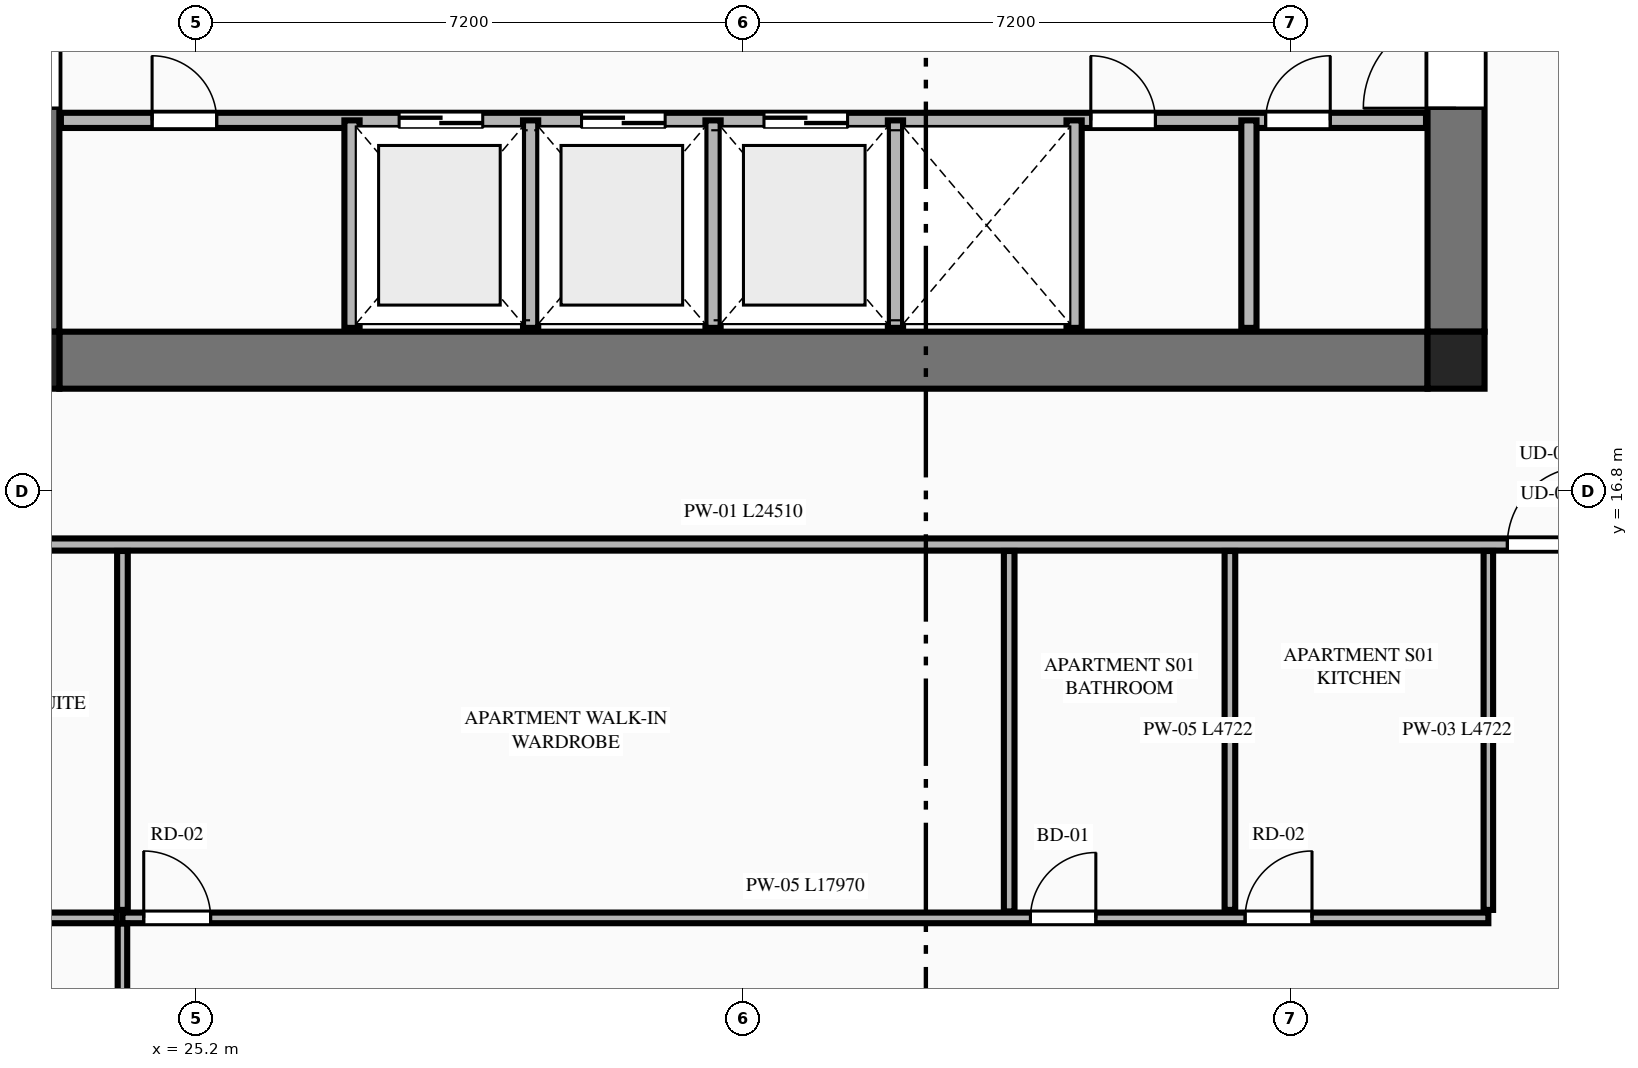
"""IFC4 building model, lengths in metres.
Left out: names, types, materials, properties, quantities, classifications, styles, units other than length and angle.
Written with IfcOpenShell. Run it as: python <this file> out.ifc"""

import sys

from ifc_helpers import new_model, si_unit, direction, frame, frame_2d, origin, origin_2d, place, context, subcontext, project, spatial, rectangle, extrude, element, fill, save


model = new_model("IFC4")
c1 = context("Model", 3, precision=1e-05, world=origin(), true_north=direction((0.0, 1.0)))
c2 = subcontext(c1, "Body", "Model", "MODEL_VIEW")
j1 = project(units=[si_unit("LENGTHUNIT", "METRE"), si_unit("PLANEANGLEUNIT", "RADIAN")], contexts=[c1])
p1 = place(None, origin())
s1 = spatial("IfcSite", under=j1, at=p1, CompositionType="ELEMENT")
p2 = place(p1, origin())
s2 = spatial("IfcBuilding", under=s1, at=p2, CompositionType="ELEMENT")
p3 = place(p2, frame((0.0, 0.0, 83.55)))
s3 = spatial("IfcBuildingStorey", under=s2, at=p3, CompositionType="ELEMENT", Elevation=83.55)
for number, where, z_axis, x_axis in (
    (1, (23.025, 18.525, 0.0), (0.0, 0.0, 1.0), (1.0, 0.0, 0.0)),
    (2, (41.775, 18.525, 0.0), (0.0, 0.0, 1.0), (1.0, 0.0, 0.0)),
):
    element("IfcColumn", number, at=place(p3, frame(where, z_axis=z_axis, x_axis=x_axis)), inside=s3, PredefinedType="COLUMN", context=c2, shape_type="SweptSolid", body=[
        extrude(rectangle(XDim=0.75, YDim=0.75, at=origin_2d()), origin(), (0.0, 0.0, 1.0), 3.55),
    ])
p4 = place(p3, frame((23.4, 18.525, 0.0), z_axis=(0.0, 0.0, 1.0), x_axis=(1.0, 0.0, 0.0)))
e3 = element("IfcWall", 3, at=p4, inside=s3, PredefinedType="SHEAR", context=c2, shape_type="SweptSolid", body=[
    extrude(rectangle(XDim=18.0, YDim=0.75, at=frame_2d((9.0, 0.0))), origin(), (0.0, 0.0, 1.0), 3.33),
])
p5 = place(p3, frame((23.025, 18.9, 0.0), z_axis=(0.0, 0.0, 1.0), x_axis=(0.0, 1.0, 0.0)))
e4 = element("IfcWall", 4, at=p5, inside=s3, PredefinedType="SHEAR", context=c2, shape_type="SweptSolid", body=[
    extrude(rectangle(XDim=14.0, YDim=0.75, at=frame_2d((7.0, 0.0))), origin(), (0.0, 0.0, 1.0), 3.33),
])
p6 = place(p5, frame((2.94, 0.0, 0.0)))
e5 = element("IfcOpeningElement", 5, at=p6, cuts=e4, PredefinedType="OPENING", context=c2, shape_type="SweptSolid", body=[
    extrude(rectangle(XDim=1.22, YDim=2.25, at=frame_2d((0.61, 1.125))), frame((0.0, 0.385, 0.0), z_axis=(0.0, -1.0, 0.0), x_axis=(1.0, 0.0, 0.0)), (0.0, 0.0, 1.0), 0.77),
])
p7 = place(p3, frame((41.775, 18.9, 0.0), z_axis=(0.0, 0.0, 1.0), x_axis=(0.0, 1.0, 0.0)))
e6 = element("IfcWall", 6, at=p7, inside=s3, PredefinedType="SHEAR", context=c2, shape_type="SweptSolid", body=[
    extrude(rectangle(XDim=14.0, YDim=0.75, at=frame_2d((7.0, 0.0))), origin(), (0.0, 0.0, 1.0), 3.33),
])
p8 = place(p7, frame((2.94, 0.0, 0.0)))
e7 = element("IfcOpeningElement", 7, at=p8, cuts=e6, PredefinedType="OPENING", context=c2, shape_type="SweptSolid", body=[
    extrude(rectangle(XDim=1.22, YDim=2.25, at=frame_2d((0.61, 1.125))), frame((0.0, 0.385, 0.0), z_axis=(0.0, -1.0, 0.0), x_axis=(1.0, 0.0, 0.0)), (0.0, 0.0, 1.0), 0.77),
])
p9 = place(p3, frame((23.42, 21.68, 0.0), z_axis=(0.0, 0.0, 1.0), x_axis=(1.0, 0.0, 0.0)))
e8 = element("IfcWall", 8, at=p9, inside=s3, PredefinedType="PLUMBINGWALL", context=c2, shape_type="SweptSolid", body=[
    extrude(rectangle(XDim=17.96, YDim=0.2, at=frame_2d((8.98, 0.0))), origin(), (0.0, 0.0, 1.0), 3.33),
])
p10 = place(p9, frame((4.45, 0.0, 0.0)))
e9 = element("IfcOpeningElement", 9, at=p10, cuts=e8, PredefinedType="OPENING", context=c2, shape_type="SweptSolid", body=[
    extrude(rectangle(XDim=1.1, YDim=2.2, at=frame_2d((0.55, 1.1))), frame((0.0, 0.11, 0.0), z_axis=(0.0, -1.0, 0.0), x_axis=(1.0, 0.0, 0.0)), (0.0, 0.0, 1.0), 0.22),
])
p11 = place(p9, frame((6.85, 0.0, 0.0)))
e10 = element("IfcOpeningElement", 10, at=p11, cuts=e8, PredefinedType="OPENING", context=c2, shape_type="SweptSolid", body=[
    extrude(rectangle(XDim=1.1, YDim=2.2, at=frame_2d((0.55, 1.1))), frame((0.0, 0.11, 0.0), z_axis=(0.0, -1.0, 0.0), x_axis=(1.0, 0.0, 0.0)), (0.0, 0.0, 1.0), 0.22),
])
p12 = place(p9, frame((9.25, 0.0, 0.0)))
e11 = element("IfcOpeningElement", 11, at=p12, cuts=e8, PredefinedType="OPENING", context=c2, shape_type="SweptSolid", body=[
    extrude(rectangle(XDim=1.1, YDim=2.2, at=frame_2d((0.55, 1.1))), frame((0.0, 0.11, 0.0), z_axis=(0.0, -1.0, 0.0), x_axis=(1.0, 0.0, 0.0)), (0.0, 0.0, 1.0), 0.22),
])
p13 = place(p9, frame((1.2, 0.0, 0.0)))
e12 = element("IfcOpeningElement", 12, at=p13, cuts=e8, PredefinedType="OPENING", context=c2, shape_type="SweptSolid", body=[
    extrude(rectangle(XDim=0.85, YDim=2.05, at=frame_2d((0.425, 1.025))), frame((0.0, 0.11, 0.0), z_axis=(0.0, -1.0, 0.0), x_axis=(1.0, 0.0, 0.0)), (0.0, 0.0, 1.0), 0.22),
])
p14 = place(p9, frame((13.55, 0.0, 0.0)))
e13 = element("IfcOpeningElement", 13, at=p14, cuts=e8, PredefinedType="OPENING", context=c2, shape_type="SweptSolid", body=[
    extrude(rectangle(XDim=0.85, YDim=2.05, at=frame_2d((0.425, 1.025))), frame((0.0, 0.11, 0.0), z_axis=(0.0, -1.0, 0.0), x_axis=(1.0, 0.0, 0.0)), (0.0, 0.0, 1.0), 0.22),
])
p15 = place(p9, frame((15.85, 0.0, 0.0)))
e14 = element("IfcOpeningElement", 14, at=p15, cuts=e8, PredefinedType="OPENING", context=c2, shape_type="SweptSolid", body=[
    extrude(rectangle(XDim=0.85, YDim=2.05, at=frame_2d((0.425, 1.025))), frame((0.0, 0.11, 0.0), z_axis=(0.0, -1.0, 0.0), x_axis=(1.0, 0.0, 0.0)), (0.0, 0.0, 1.0), 0.22),
])
for number, where, z_axis, x_axis in (
    (15, (27.25, 18.95, 0.0), (0.0, 0.0, 1.0), (0.0, 1.0, 0.0)),
    (16, (29.6, 18.95, 0.0), (0.0, 0.0, 1.0), (0.0, 1.0, 0.0)),
    (17, (32.0, 18.95, 0.0), (0.0, 0.0, 1.0), (0.0, 1.0, 0.0)),
    (18, (34.4, 18.95, 0.0), (0.0, 0.0, 1.0), (0.0, 1.0, 0.0)),
    (19, (36.75, 18.95, 0.0), (0.0, 0.0, 1.0), (0.0, 1.0, 0.0)),
    (20, (39.05, 18.95, 0.0), (0.0, 0.0, 1.0), (0.0, 1.0, 0.0)),
):
    element("IfcWall", number, at=place(p3, frame(where, z_axis=z_axis, x_axis=x_axis)), inside=s3, PredefinedType="PLUMBINGWALL", context=c2, shape_type="SweptSolid", body=[
        extrude(rectangle(XDim=2.73, YDim=0.2, at=frame_2d((1.365, 0.0))), origin(), (0.0, 0.0, 1.0), 3.33),
    ])
p16 = place(p3, frame((20.145, 16.1, 0.0), z_axis=(0.0, 0.0, 1.0), x_axis=(1.0, 0.0, 0.0)))
e21 = element("IfcWall", 21, at=p16, inside=s3, PredefinedType="PARTITIONING", context=c2, shape_type="SweptSolid", body=[
    extrude(rectangle(XDim=24.51, YDim=0.16, at=frame_2d((12.255, 0.0))), origin(), (0.0, 0.0, 1.0), 3.33),
])
p17 = place(p16, frame((22.305, 0.0, 0.0)))
e22 = element("IfcOpeningElement", 22, at=p17, cuts=e21, PredefinedType="OPENING", context=c2, shape_type="SweptSolid", body=[
    extrude(rectangle(XDim=1.02, YDim=2.25, at=frame_2d((0.51, 1.125))), frame((0.0, 0.09, 0.0), z_axis=(0.0, -1.0, 0.0), x_axis=(1.0, 0.0, 0.0)), (0.0, 0.0, 1.0), 0.18),
])
p18 = place(p3, frame((42.2, 11.293, 0.0), z_axis=(0.0, 0.0, 1.0), x_axis=(0.0, 1.0, 0.0)))
e23 = element("IfcWall", 23, at=p18, inside=s3, PredefinedType="PARTITIONING", context=c2, shape_type="SweptSolid", body=[
    extrude(rectangle(XDim=4.722, YDim=0.125, at=frame_2d((2.361, 0.0))), origin(), (0.0, 0.0, 1.0), 2.636),
])
p19 = place(p3, frame((24.23, 11.188, 0.0), z_axis=(0.0, 0.0, 1.0), x_axis=(1.0, 0.0, 0.0)))
e24 = element("IfcWall", 24, at=p19, inside=s3, PredefinedType="PLUMBINGWALL", context=c2, shape_type="SweptSolid", body=[
    extrude(rectangle(XDim=17.97, YDim=0.14, at=frame_2d((8.985, 0.0))), origin(), (0.0, 0.0, 1.0), 3.33),
])
p20 = place(p19, frame((0.28, 0.0, 0.0)))
e25 = element("IfcOpeningElement", 25, at=p20, cuts=e24, PredefinedType="OPENING", context=c2, shape_type="SweptSolid", body=[
    extrude(rectangle(XDim=0.88, YDim=2.15, at=frame_2d((0.44, 1.075))), frame((0.0, 0.08, 0.0), z_axis=(0.0, -1.0, 0.0), x_axis=(1.0, 0.0, 0.0)), (0.0, 0.0, 1.0), 0.16),
])
p21 = place(p19, frame((11.946, 0.0, 0.0)))
e26 = element("IfcOpeningElement", 26, at=p21, cuts=e24, PredefinedType="OPENING", context=c2, shape_type="SweptSolid", body=[
    extrude(rectangle(XDim=0.86, YDim=2.1, at=frame_2d((0.43, 1.05))), frame((0.0, 0.08, 0.0), z_axis=(0.0, -1.0, 0.0), x_axis=(1.0, 0.0, 0.0)), (0.0, 0.0, 1.0), 0.16),
])
p22 = place(p19, frame((14.77, 0.0, 0.0)))
e27 = element("IfcOpeningElement", 27, at=p22, cuts=e24, PredefinedType="OPENING", context=c2, shape_type="SweptSolid", body=[
    extrude(rectangle(XDim=0.88, YDim=2.15, at=frame_2d((0.44, 1.075))), frame((0.0, 0.08, 0.0), z_axis=(0.0, -1.0, 0.0), x_axis=(1.0, 0.0, 0.0)), (0.0, 0.0, 1.0), 0.16),
])
p23 = place(p3, frame((20.145, 11.188, 0.0), z_axis=(0.0, 0.0, 1.0), x_axis=(1.0, 0.0, 0.0)))
e28 = element("IfcWall", 28, at=p23, inside=s3, PredefinedType="PLUMBINGWALL", context=c2, shape_type="SweptSolid", body=[
    extrude(rectangle(XDim=4.01, YDim=0.14, at=frame_2d((2.005, 0.0))), origin(), (0.0, 0.0, 1.0), 3.33),
])
p24 = place(p23, frame((1.58, 0.0, 0.0)))
e29 = element("IfcOpeningElement", 29, at=p24, cuts=e28, PredefinedType="OPENING", context=c2, shape_type="SweptSolid", body=[
    extrude(rectangle(XDim=0.86, YDim=2.1, at=frame_2d((0.43, 1.05))), frame((0.0, 0.08, 0.0), z_axis=(0.0, -1.0, 0.0), x_axis=(1.0, 0.0, 0.0)), (0.0, 0.0, 1.0), 0.16),
])
for number, where, z_axis, x_axis in (
    (30, (38.8, 11.293, 0.0), (0.0, 0.0, 1.0), (0.0, 1.0, 0.0)),
    (31, (24.23, 11.293, 0.0), (0.0, 0.0, 1.0), (0.0, 1.0, 0.0)),
):
    element("IfcWall", number, at=place(p3, frame(where, z_axis=z_axis, x_axis=x_axis)), inside=s3, PredefinedType="PLUMBINGWALL", context=c2, shape_type="SweptSolid", body=[
        extrude(rectangle(XDim=4.722, YDim=0.14, at=frame_2d((2.361, 0.0))), origin(), (0.0, 0.0, 1.0), 3.33),
    ])
p25 = place(p3, frame((24.23, 2.365, 0.0), z_axis=(0.0, 0.0, 1.0), x_axis=(0.0, 1.0, 0.0)))
e32 = element("IfcWall", 32, at=p25, inside=s3, PredefinedType="PARTITIONING", context=c2, shape_type="SweptSolid", body=[
    extrude(rectangle(XDim=8.748, YDim=0.125, at=frame_2d((4.374, 0.0))), origin(), (0.0, 0.0, 1.0), 3.33),
])
p26 = place(p25, frame((0.35, 0.0, 0.0)))
e33 = element("IfcOpeningElement", 33, at=p26, cuts=e32, PredefinedType="OPENING", context=c2, shape_type="SweptSolid", body=[
    extrude(rectangle(XDim=0.92, YDim=2.15, at=frame_2d((0.46, 1.075))), frame((0.0, 0.073, 0.0), z_axis=(0.0, -1.0, 0.0), x_axis=(1.0, 0.0, 0.0)), (0.0, 0.0, 1.0), 0.145),
])
p27 = place(p3, frame((35.896, 11.273, 0.0), z_axis=(0.0, 0.0, 1.0), x_axis=(0.0, 1.0, 0.0)))
e34 = element("IfcWall", 34, at=p27, inside=s3, PredefinedType="PLUMBINGWALL", context=c2, shape_type="SweptSolid", body=[
    extrude(rectangle(XDim=4.742, YDim=0.14, at=frame_2d((2.371, 0.0))), origin(), (0.0, 0.0, 1.0), 3.33),
])
p28 = place(p8, origin())
e35 = element("IfcDoor", 35, at=p28, inside=s3, OperationType="SINGLE_SWING_LEFT", PredefinedType="DOOR", context=c2, shape_type="SweptSolid", body=[
    extrude(rectangle(XDim=1.22, YDim=2.25, at=frame_2d((0.61, 1.125))), frame((0.0, 0.025, 0.0), z_axis=(0.0, -1.0, 0.0), x_axis=(1.0, 0.0, 0.0)), (0.0, 0.0, 1.0), 0.05),
])
fill(e7, e35)
p29 = place(p10, origin())
e36 = element("IfcDoor", 36, at=p29, inside=s3, OperationType="DOUBLE_DOOR_SLIDING", PredefinedType="DOOR", context=c2, shape_type="SweptSolid", body=[
    extrude(rectangle(XDim=1.1, YDim=2.2, at=frame_2d((0.55, 1.1))), frame((0.0, 0.025, 0.0), z_axis=(0.0, -1.0, 0.0), x_axis=(1.0, 0.0, 0.0)), (0.0, 0.0, 1.0), 0.05),
])
fill(e9, e36)
p30 = place(p11, origin())
e37 = element("IfcDoor", 37, at=p30, inside=s3, OperationType="DOUBLE_DOOR_SLIDING", PredefinedType="DOOR", context=c2, shape_type="SweptSolid", body=[
    extrude(rectangle(XDim=1.1, YDim=2.2, at=frame_2d((0.55, 1.1))), frame((0.0, 0.025, 0.0), z_axis=(0.0, -1.0, 0.0), x_axis=(1.0, 0.0, 0.0)), (0.0, 0.0, 1.0), 0.05),
])
fill(e10, e37)
p31 = place(p12, origin())
e38 = element("IfcDoor", 38, at=p31, inside=s3, OperationType="DOUBLE_DOOR_SLIDING", PredefinedType="DOOR", context=c2, shape_type="SweptSolid", body=[
    extrude(rectangle(XDim=1.1, YDim=2.2, at=frame_2d((0.55, 1.1))), frame((0.0, 0.025, 0.0), z_axis=(0.0, -1.0, 0.0), x_axis=(1.0, 0.0, 0.0)), (0.0, 0.0, 1.0), 0.05),
])
fill(e11, e38)
p32 = place(p13, origin())
e39 = element("IfcDoor", 39, at=p32, inside=s3, OperationType="SINGLE_SWING_LEFT", PredefinedType="DOOR", context=c2, shape_type="SweptSolid", body=[
    extrude(rectangle(XDim=0.85, YDim=2.05, at=frame_2d((0.425, 1.025))), frame((0.0, 0.025, 0.0), z_axis=(0.0, -1.0, 0.0), x_axis=(1.0, 0.0, 0.0)), (0.0, 0.0, 1.0), 0.05),
])
fill(e12, e39)
p33 = place(p14, origin())
e40 = element("IfcDoor", 40, at=p33, inside=s3, OperationType="SINGLE_SWING_LEFT", PredefinedType="DOOR", context=c2, shape_type="SweptSolid", body=[
    extrude(rectangle(XDim=0.85, YDim=2.05, at=frame_2d((0.425, 1.025))), frame((0.0, 0.025, 0.0), z_axis=(0.0, -1.0, 0.0), x_axis=(1.0, 0.0, 0.0)), (0.0, 0.0, 1.0), 0.05),
])
fill(e13, e40)
p34 = place(p15, origin())
e41 = element("IfcDoor", 41, at=p34, inside=s3, OperationType="SINGLE_SWING_RIGHT", PredefinedType="DOOR", context=c2, shape_type="SweptSolid", body=[
    extrude(rectangle(XDim=0.85, YDim=2.05, at=frame_2d((0.425, 1.025))), frame((0.0, 0.025, 0.0), z_axis=(0.0, -1.0, 0.0), x_axis=(1.0, 0.0, 0.0)), (0.0, 0.0, 1.0), 0.05),
])
fill(e14, e41)
p35 = place(p20, origin())
e42 = element("IfcDoor", 42, at=p35, inside=s3, OperationType="SINGLE_SWING_LEFT", PredefinedType="DOOR", context=c2, shape_type="SweptSolid", body=[
    extrude(rectangle(XDim=0.88, YDim=2.15, at=frame_2d((0.44, 1.075))), frame((0.0, 0.025, 0.0), z_axis=(0.0, -1.0, 0.0), x_axis=(1.0, 0.0, 0.0)), (0.0, 0.0, 1.0), 0.05),
])
fill(e25, e42)
p36 = place(p21, origin())
e43 = element("IfcDoor", 43, at=p36, inside=s3, OperationType="SINGLE_SWING_RIGHT", PredefinedType="DOOR", context=c2, shape_type="SweptSolid", body=[
    extrude(rectangle(XDim=0.86, YDim=2.1, at=frame_2d((0.43, 1.05))), frame((0.0, 0.025, 0.0), z_axis=(0.0, -1.0, 0.0), x_axis=(1.0, 0.0, 0.0)), (0.0, 0.0, 1.0), 0.05),
])
fill(e26, e43)
p37 = place(p17, origin())
e44 = element("IfcDoor", 44, at=p37, inside=s3, OperationType="SINGLE_SWING_RIGHT", PredefinedType="DOOR", context=c2, shape_type="SweptSolid", body=[
    extrude(rectangle(XDim=1.02, YDim=2.25, at=frame_2d((0.51, 1.125))), frame((0.0, 0.025, 0.0), z_axis=(0.0, -1.0, 0.0), x_axis=(1.0, 0.0, 0.0)), (0.0, 0.0, 1.0), 0.05),
])
fill(e22, e44)
p38 = place(p22, origin())
e45 = element("IfcDoor", 45, at=p38, inside=s3, OperationType="SINGLE_SWING_RIGHT", PredefinedType="DOOR", context=c2, shape_type="SweptSolid", body=[
    extrude(rectangle(XDim=0.88, YDim=2.15, at=frame_2d((0.44, 1.075))), frame((0.0, 0.025, 0.0), z_axis=(0.0, -1.0, 0.0), x_axis=(1.0, 0.0, 0.0)), (0.0, 0.0, 1.0), 0.05),
])
fill(e27, e45)
save(model, sys.argv[1])
